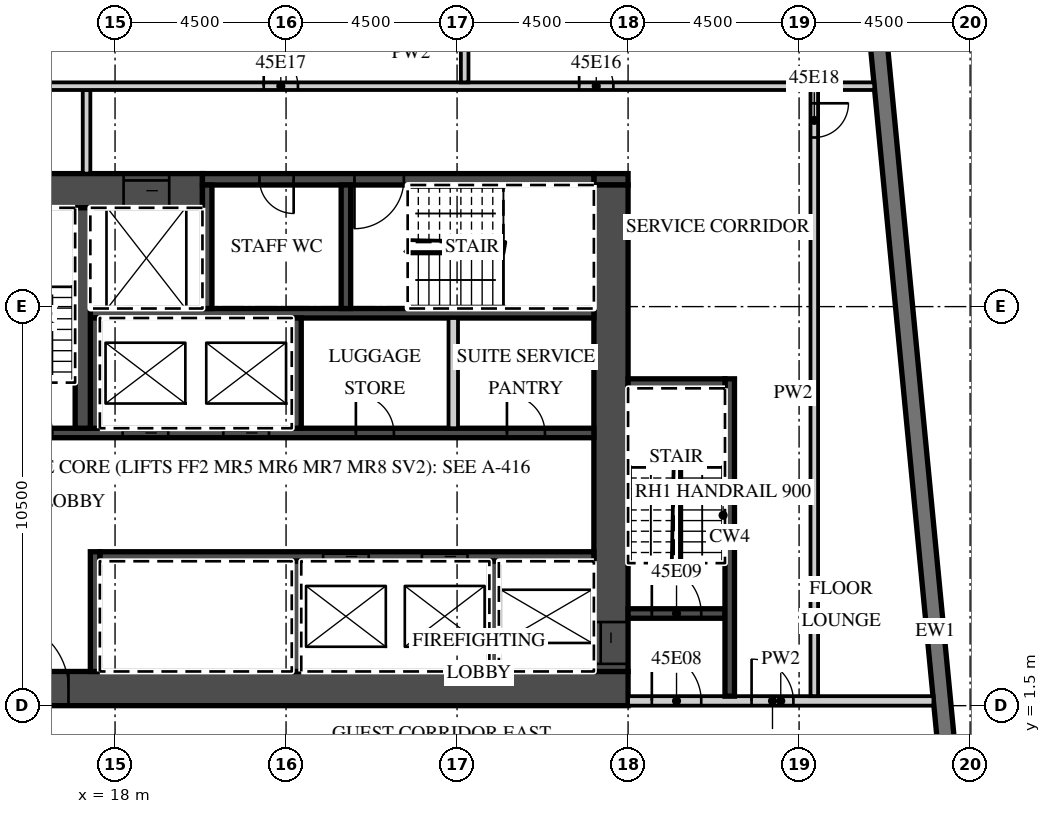
"""IFC4 building model, lengths in metres.
Left out: names, types, materials, properties, quantities, classifications, styles, units other than length and angle.
Written with IfcOpenShell. Run it as: python <this file> out.ifc"""

import sys

from ifc_helpers import new_model, si_unit, direction, frame, frame_2d, origin, place, context, subcontext, project, spatial, rectangle, extrude, element, fill, save


model = new_model("IFC4")
c1 = context("Model", 3, precision=1e-05, world=origin(), true_north=direction((0.0, 1.0)))
c2 = subcontext(c1, "Body", "Model", "MODEL_VIEW")
j1 = project(units=[si_unit("LENGTHUNIT", "METRE"), si_unit("PLANEANGLEUNIT", "RADIAN")], contexts=[c1])
p1 = place(None, origin())
s1 = spatial("IfcSite", under=j1, at=p1, CompositionType="ELEMENT")
p2 = place(p1, origin())
s2 = spatial("IfcBuilding", under=s1, at=p2, CompositionType="ELEMENT")
p3 = place(p2, frame((0.0, 0.0, 190.0)))
s3 = spatial("IfcBuildingStorey", under=s2, at=p3, CompositionType="ELEMENT", Elevation=190.0)
p4 = place(p3, frame((41.214, -13.466, 0.0), z_axis=(0.0, 0.0, 1.0), x_axis=(-0.095847314626, 0.995396047952, 0.0)))
e1 = element("IfcWall", 1, at=p4, inside=s3, PredefinedType="SOLIDWALL", context=c2, shape_type="SweptSolid", body=[
    extrude(rectangle(XDim=34.0, YDim=0.45, at=frame_2d((17.0, 0.0))), origin(), (0.0, 0.0, 1.0), 3.02),
])
p5 = place(p4, frame((3.869, 0.0, 0.45)))
e2 = element("IfcOpeningElement", 2, at=p5, cuts=e1, PredefinedType="OPENING", context=c2, shape_type="SweptSolid", body=[
    extrude(rectangle(XDim=3.3, YDim=2.25, at=frame_2d((1.65, 1.125))), frame((0.0, 0.235, 0.0), z_axis=(0.0, -1.0, 0.0), x_axis=(1.0, 0.0, 0.0)), (0.0, 0.0, 1.0), 0.47),
])
p6 = place(p4, frame((8.39, 0.0, 0.45)))
e3 = element("IfcOpeningElement", 3, at=p6, cuts=e1, PredefinedType="OPENING", context=c2, shape_type="SweptSolid", body=[
    extrude(rectangle(XDim=3.3, YDim=2.25, at=frame_2d((1.65, 1.125))), frame((0.0, 0.235, 0.0), z_axis=(0.0, -1.0, 0.0), x_axis=(1.0, 0.0, 0.0)), (0.0, 0.0, 1.0), 0.47),
])
p7 = place(p3, frame((13.5, 1.95, 0.0), z_axis=(0.0, 0.0, 1.0), x_axis=(1.0, 0.0, 0.0)))
e4 = element("IfcWall", 4, at=p7, inside=s3, PredefinedType="SHEAR", context=c2, shape_type="SweptSolid", body=[
    extrude(rectangle(XDim=18.0, YDim=0.9, at=frame_2d((9.0, 0.0))), origin(), (0.0, 0.0, 1.0), 3.02),
])
p8 = place(p7, frame((1.475, 0.0, 0.0)))
e5 = element("IfcOpeningElement", 5, at=p8, cuts=e4, PredefinedType="OPENING", context=c2, shape_type="SweptSolid", body=[
    extrude(rectangle(XDim=1.8, YDim=2.1, at=frame_2d((0.9, 1.05))), frame((0.0, 0.46, 0.0), z_axis=(0.0, -1.0, 0.0), x_axis=(1.0, 0.0, 0.0)), (0.0, 0.0, 1.0), 0.92),
])
p9 = place(p3, frame((13.5, 15.05, 0.0), z_axis=(0.0, 0.0, 1.0), x_axis=(1.0, 0.0, 0.0)))
e6 = element("IfcWall", 6, at=p9, inside=s3, PredefinedType="SHEAR", context=c2, shape_type="SweptSolid", body=[
    extrude(rectangle(XDim=6.8, YDim=0.9, at=frame_2d((3.4, 0.0))), origin(), (0.0, 0.0, 1.0), 3.02),
])
p10 = place(p9, frame((4.725, 0.0, 0.0)))
e7 = element("IfcOpeningElement", 7, at=p10, cuts=e6, PredefinedType="OPENING", context=c2, shape_type="SweptSolid", body=[
    extrude(rectangle(XDim=1.2, YDim=2.1, at=frame_2d((0.6, 1.05))), frame((0.0, 0.46, 0.0), z_axis=(0.0, -1.0, 0.0), x_axis=(1.0, 0.0, 0.0)), (0.0, 0.0, 1.0), 0.92),
])
p11 = place(p3, frame((30.6, 15.35, 0.0), z_axis=(0.0, 0.0, 1.0), x_axis=(1.0, 0.0, 0.0)))
e8 = element("IfcWall", 8, at=p11, inside=s3, PredefinedType="SHEAR", context=c2, shape_type="SweptSolid", body=[
    extrude(rectangle(XDim=0.9, YDim=0.3, at=frame_2d((0.45, 0.0))), origin(), (0.0, 0.0, 1.0), 3.02),
])
p12 = place(p3, frame((20.3, 15.35, 0.0), z_axis=(0.0, 0.0, 1.0), x_axis=(1.0, 0.0, 0.0)))
e9 = element("IfcWall", 9, at=p12, inside=s3, PredefinedType="SHEAR", context=c2, shape_type="SweptSolid", body=[
    extrude(rectangle(XDim=10.3, YDim=0.3, at=frame_2d((5.15, 0.0))), origin(), (0.0, 0.0, 1.0), 3.02),
])
p13 = place(p12, frame((4.0, 0.0, 0.0)))
e10 = element("IfcOpeningElement", 10, at=p13, cuts=e9, PredefinedType="OPENING", context=c2, shape_type="SweptSolid", body=[
    extrude(rectangle(XDim=1.3, YDim=2.1, at=frame_2d((0.65, 1.05))), frame((0.0, 0.16, 0.0), z_axis=(0.0, -1.0, 0.0), x_axis=(1.0, 0.0, 0.0)), (0.0, 0.0, 1.0), 0.32),
])
p14 = place(p12, frame((1.5, 0.0, 0.0)))
e11 = element("IfcOpeningElement", 11, at=p14, cuts=e9, PredefinedType="OPENING", context=c2, shape_type="SweptSolid", body=[
    extrude(rectangle(XDim=0.9, YDim=2.1, at=frame_2d((0.45, 1.05))), frame((0.0, 0.16, 0.0), z_axis=(0.0, -1.0, 0.0), x_axis=(1.0, 0.0, 0.0)), (0.0, 0.0, 1.0), 0.32),
])
p15 = place(p3, frame((31.05, 2.4, 0.0), z_axis=(0.0, 0.0, 1.0), x_axis=(0.0, 1.0, 0.0)))
e12 = element("IfcWall", 12, at=p15, inside=s3, PredefinedType="SHEAR", context=c2, shape_type="SweptSolid", body=[
    extrude(rectangle(XDim=12.8, YDim=0.9, at=frame_2d((6.4, 0.0))), origin(), (0.0, 0.0, 1.0), 3.02),
])
p16 = place(p15, frame((0.2, 0.0, 0.0)))
e13 = element("IfcOpeningElement", 13, at=p16, cuts=e12, PredefinedType="OPENING", context=c2, shape_type="SweptSolid", body=[
    extrude(rectangle(XDim=1.1, YDim=2.1, at=frame_2d((0.55, 1.05))), frame((0.0, 0.46, 0.0), z_axis=(0.0, -1.0, 0.0), x_axis=(1.0, 0.0, 0.0)), (0.0, 0.0, 1.0), 0.92),
])
p17 = place(p3, frame((17.6, 5.425, 0.0), z_axis=(0.0, 0.0, 1.0), x_axis=(1.0, 0.0, 0.0)))
e14 = element("IfcWall", 14, at=p17, inside=s3, PredefinedType="SHEAR", context=c2, shape_type="SweptSolid", body=[
    extrude(rectangle(XDim=13.0, YDim=0.25, at=frame_2d((6.5, 0.0))), origin(), (0.0, 0.0, 1.0), 3.02),
])
p18 = place(p17, frame((8.475, 0.0, 0.0)))
e15 = element("IfcOpeningElement", 15, at=p18, cuts=e14, PredefinedType="OPENING", context=c2, shape_type="SweptSolid", body=[
    extrude(rectangle(XDim=1.2, YDim=2.1, at=frame_2d((0.6, 1.05))), frame((0.0, 0.135, 0.0), z_axis=(0.0, -1.0, 0.0), x_axis=(1.0, 0.0, 0.0)), (0.0, 0.0, 1.0), 0.27),
])
p19 = place(p17, frame((5.875, 0.0, 0.0)))
e16 = element("IfcOpeningElement", 16, at=p19, cuts=e14, PredefinedType="OPENING", context=c2, shape_type="SweptSolid", body=[
    extrude(rectangle(XDim=1.2, YDim=2.1, at=frame_2d((0.6, 1.05))), frame((0.0, 0.135, 0.0), z_axis=(0.0, -1.0, 0.0), x_axis=(1.0, 0.0, 0.0)), (0.0, 0.0, 1.0), 0.27),
])
p20 = place(p3, frame((17.475, 2.4, 0.0), z_axis=(0.0, 0.0, 1.0), x_axis=(0.0, 1.0, 0.0)))
e17 = element("IfcWall", 17, at=p20, inside=s3, PredefinedType="SHEAR", context=c2, shape_type="SweptSolid", body=[
    extrude(rectangle(XDim=3.15, YDim=0.25, at=frame_2d((1.575, 0.0))), origin(), (0.0, 0.0, 1.0), 3.02),
])
for number, where, z_axis, x_axis in (
    (18, (27.975, 2.4, 0.0), (0.0, 0.0, 1.0), (0.0, 1.0, 0.0)),
    (19, (22.775, 2.4, 0.0), (0.0, 0.0, 1.0), (0.0, 1.0, 0.0)),
):
    element("IfcWall", number, at=place(p3, frame(where, z_axis=z_axis, x_axis=x_axis)), inside=s3, PredefinedType="SHEAR", context=c2, shape_type="SweptSolid", body=[
        extrude(rectangle(XDim=2.9, YDim=0.25, at=frame_2d((1.45, 0.0))), origin(), (0.0, 0.0, 1.0), 3.02),
    ])
p21 = place(p3, frame((14.4, 8.675, 0.0), z_axis=(0.0, 0.0, 1.0), x_axis=(1.0, 0.0, 0.0)))
e20 = element("IfcWall", 20, at=p21, inside=s3, PredefinedType="SHEAR", context=c2, shape_type="SweptSolid", body=[
    extrude(rectangle(XDim=16.2, YDim=0.25, at=frame_2d((8.1, 0.0))), origin(), (0.0, 0.0, 1.0), 3.02),
])
p22 = place(p21, frame((6.45, 0.0, 0.0)))
e21 = element("IfcOpeningElement", 21, at=p22, cuts=e20, PredefinedType="OPENING", context=c2, shape_type="SweptSolid", body=[
    extrude(rectangle(XDim=1.2, YDim=2.1, at=frame_2d((0.6, 1.05))), frame((0.0, 0.135, 0.0), z_axis=(0.0, -1.0, 0.0), x_axis=(1.0, 0.0, 0.0)), (0.0, 0.0, 1.0), 0.27),
])
p23 = place(p21, frame((3.8, 0.0, 0.0)))
e22 = element("IfcOpeningElement", 22, at=p23, cuts=e20, PredefinedType="OPENING", context=c2, shape_type="SweptSolid", body=[
    extrude(rectangle(XDim=1.2, YDim=2.1, at=frame_2d((0.6, 1.05))), frame((0.0, 0.135, 0.0), z_axis=(0.0, -1.0, 0.0), x_axis=(1.0, 0.0, 0.0)), (0.0, 0.0, 1.0), 0.27),
])
p24 = place(p21, frame((0.65, 0.0, 0.0)))
e23 = element("IfcOpeningElement", 23, at=p24, cuts=e20, PredefinedType="OPENING", context=c2, shape_type="SweptSolid", body=[
    extrude(rectangle(XDim=1.3, YDim=2.1, at=frame_2d((0.65, 1.05))), frame((0.0, 0.135, 0.0), z_axis=(0.0, -1.0, 0.0), x_axis=(1.0, 0.0, 0.0)), (0.0, 0.0, 1.0), 0.27),
])
p25 = place(p21, frame((13.913, 0.0, 0.0)))
e24 = element("IfcOpeningElement", 24, at=p25, cuts=e20, PredefinedType="OPENING", context=c2, shape_type="SweptSolid", body=[
    extrude(rectangle(XDim=1.0, YDim=2.1, at=frame_2d((0.5, 1.05))), frame((0.0, 0.135, 0.0), z_axis=(0.0, -1.0, 0.0), x_axis=(1.0, 0.0, 0.0)), (0.0, 0.0, 1.0), 0.27),
])
p26 = place(p21, frame((9.938, 0.0, 0.0)))
e25 = element("IfcOpeningElement", 25, at=p26, cuts=e20, PredefinedType="OPENING", context=c2, shape_type="SweptSolid", body=[
    extrude(rectangle(XDim=1.0, YDim=2.1, at=frame_2d((0.5, 1.05))), frame((0.0, 0.135, 0.0), z_axis=(0.0, -1.0, 0.0), x_axis=(1.0, 0.0, 0.0)), (0.0, 0.0, 1.0), 0.27),
])
p27 = place(p3, frame((17.35, 11.825, 0.0), z_axis=(0.0, 0.0, 1.0), x_axis=(1.0, 0.0, 0.0)))
e26 = element("IfcWall", 26, at=p27, inside=s3, PredefinedType="SHEAR", context=c2, shape_type="SweptSolid", body=[
    extrude(rectangle(XDim=13.25, YDim=0.25, at=frame_2d((6.625, 0.0))), origin(), (0.0, 0.0, 1.0), 3.02),
])
for number, where, z_axis, x_axis in (
    (27, (17.475, 8.8, 0.0), (0.0, 0.0, 1.0), (0.0, 1.0, 0.0)),
    (28, (22.775, 8.8, 0.0), (0.0, 0.0, 1.0), (0.0, 1.0, 0.0)),
):
    element("IfcWall", number, at=place(p3, frame(where, z_axis=z_axis, x_axis=x_axis)), inside=s3, PredefinedType="SHEAR", context=c2, shape_type="SweptSolid", body=[
        extrude(rectangle(XDim=2.9, YDim=0.25, at=frame_2d((1.45, 0.0))), origin(), (0.0, 0.0, 1.0), 3.02),
    ])
p28 = place(p3, frame((26.9, 8.8, 0.0), z_axis=(0.0, 0.0, 1.0), x_axis=(0.0, 1.0, 0.0)))
e29 = element("IfcWall", 29, at=p28, inside=s3, PredefinedType="PARTITIONING", context=c2, shape_type="SweptSolid", body=[
    extrude(rectangle(XDim=2.9, YDim=0.25, at=frame_2d((1.45, 0.0))), origin(), (0.0, 0.0, 1.0), 3.02),
])
p29 = place(p3, frame((17.15, 8.8, 0.0), z_axis=(0.0, 0.0, 1.0), x_axis=(0.0, 1.0, 0.0)))
e30 = element("IfcWall", 30, at=p29, inside=s3, PredefinedType="SHEAR", context=c2, shape_type="SweptSolid", body=[
    extrude(rectangle(XDim=5.8, YDim=0.4, at=frame_2d((2.9, 0.0))), origin(), (0.0, 0.0, 1.0), 3.02),
])
for number, where, z_axis, x_axis in (
    (31, (20.425, 11.95, 0.0), (0.0, 0.0, 1.0), (0.0, 1.0, 0.0)),
    (32, (24.075, 11.95, 0.0), (0.0, 0.0, 1.0), (0.0, 1.0, 0.0)),
):
    element("IfcWall", number, at=place(p3, frame(where, z_axis=z_axis, x_axis=x_axis)), inside=s3, PredefinedType="SHEAR", context=c2, shape_type="SweptSolid", body=[
        extrude(rectangle(XDim=3.25, YDim=0.25, at=frame_2d((1.625, 0.0))), origin(), (0.0, 0.0, 1.0), 3.02),
    ])
p30 = place(p3, frame((31.5, 1.625, 0.0), z_axis=(0.0, 0.0, 1.0), x_axis=(1.0, 0.0, 0.0)))
e33 = element("IfcWall", 33, at=p30, inside=s3, PredefinedType="PARTITIONING", context=c2, shape_type="SweptSolid", body=[
    extrude(rectangle(XDim=8.035, YDim=0.25, at=frame_2d((4.018, 0.0))), origin(), (0.0, 0.0, 1.0), 3.02),
])
p31 = place(p30, frame((0.625, 0.0, 0.0)))
e34 = element("IfcOpeningElement", 34, at=p31, cuts=e33, PredefinedType="OPENING", context=c2, shape_type="SweptSolid", body=[
    extrude(rectangle(XDim=1.3, YDim=2.1, at=frame_2d((0.65, 1.05))), frame((0.0, 0.135, 0.0), z_axis=(0.0, -1.0, 0.0), x_axis=(1.0, 0.0, 0.0)), (0.0, 0.0, 1.0), 0.27),
])
p32 = place(p30, frame((3.25, 0.0, 0.0)))
e35 = element("IfcOpeningElement", 35, at=p32, cuts=e33, PredefinedType="OPENING", context=c2, shape_type="SweptSolid", body=[
    extrude(rectangle(XDim=1.1, YDim=2.1, at=frame_2d((0.55, 1.05))), frame((0.0, 0.135, 0.0), z_axis=(0.0, -1.0, 0.0), x_axis=(1.0, 0.0, 0.0)), (0.0, 0.0, 1.0), 0.27),
])
p33 = place(p3, frame((31.5, 3.925, 0.0), z_axis=(0.0, 0.0, 1.0), x_axis=(1.0, 0.0, 0.0)))
e36 = element("IfcWall", 36, at=p33, inside=s3, PredefinedType="SHEAR", context=c2, shape_type="SweptSolid", body=[
    extrude(rectangle(XDim=2.55, YDim=0.25, at=frame_2d((1.275, 0.0))), origin(), (0.0, 0.0, 1.0), 3.02),
])
p34 = place(p33, frame((0.625, 0.0, 0.0)))
e37 = element("IfcOpeningElement", 37, at=p34, cuts=e36, PredefinedType="OPENING", context=c2, shape_type="SweptSolid", body=[
    extrude(rectangle(XDim=1.3, YDim=2.1, at=frame_2d((0.65, 1.05))), frame((0.0, 0.135, 0.0), z_axis=(0.0, -1.0, 0.0), x_axis=(1.0, 0.0, 0.0)), (0.0, 0.0, 1.0), 0.27),
])
p35 = place(p3, frame((34.175, 1.75, 0.0), z_axis=(0.0, 0.0, 1.0), x_axis=(0.0, 1.0, 0.0)))
e38 = element("IfcWall", 38, at=p35, inside=s3, PredefinedType="SHEAR", context=c2, shape_type="SweptSolid", body=[
    extrude(rectangle(XDim=8.35, YDim=0.25, at=frame_2d((4.175, 0.0))), origin(), (0.0, 0.0, 1.0), 3.02),
])
p36 = place(p3, frame((31.5, 9.975, 0.0), z_axis=(0.0, 0.0, 1.0), x_axis=(1.0, 0.0, 0.0)))
e39 = element("IfcWall", 39, at=p36, inside=s3, PredefinedType="SHEAR", context=c2, shape_type="SweptSolid", body=[
    extrude(rectangle(XDim=2.55, YDim=0.25, at=frame_2d((1.275, 0.0))), origin(), (0.0, 0.0, 1.0), 3.02),
])
p37 = place(p3, frame((17.25, 15.5, 0.0), z_axis=(0.0, 0.0, 1.0), x_axis=(0.0, 1.0, 0.0)))
e40 = element("IfcWall", 40, at=p37, inside=s3, PredefinedType="PARTITIONING", context=c2, shape_type="SweptSolid", body=[
    extrude(rectangle(XDim=2.2, YDim=0.2, at=frame_2d((1.1, 0.0))), origin(), (0.0, 0.0, 1.0), 3.02),
])
p38 = place(p3, frame((36.4, 1.75, 0.0), z_axis=(0.0, 0.0, 1.0), x_axis=(0.0, 1.0, 0.0)))
e41 = element("IfcWall", 41, at=p38, inside=s3, PredefinedType="PARTITIONING", context=c2, shape_type="SweptSolid", body=[
    extrude(rectangle(XDim=15.95, YDim=0.2, at=frame_2d((7.975, 0.0))), origin(), (0.0, 0.0, 1.0), 3.02),
])
p39 = place(p38, frame((14.7, 0.0, 0.0)))
e42 = element("IfcOpeningElement", 42, at=p39, cuts=e41, PredefinedType="OPENING", context=c2, shape_type="SweptSolid", body=[
    extrude(rectangle(XDim=0.9, YDim=2.1, at=frame_2d((0.45, 1.05))), frame((0.0, 0.11, 0.0), z_axis=(0.0, -1.0, 0.0), x_axis=(1.0, 0.0, 0.0)), (0.0, 0.0, 1.0), 0.22),
])
p40 = place(p3, frame((13.6, 17.8, 0.0), z_axis=(0.0, 0.0, 1.0), x_axis=(1.0, 0.0, 0.0)))
e43 = element("IfcWall", 43, at=p40, inside=s3, PredefinedType="PARTITIONING", context=c2, shape_type="SweptSolid", body=[
    extrude(rectangle(XDim=24.378, YDim=0.2, at=frame_2d((12.189, 0.0))), origin(), (0.0, 0.0, 1.0), 3.02),
])
p41 = place(p40, frame((16.613, 0.0, 0.0)))
e44 = element("IfcOpeningElement", 44, at=p41, cuts=e43, PredefinedType="OPENING", context=c2, shape_type="SweptSolid", body=[
    extrude(rectangle(XDim=0.9, YDim=2.1, at=frame_2d((0.45, 1.05))), frame((0.0, 0.11, 0.0), z_axis=(0.0, -1.0, 0.0), x_axis=(1.0, 0.0, 0.0)), (0.0, 0.0, 1.0), 0.22),
])
p42 = place(p40, frame((8.312, 0.0, 0.0)))
e45 = element("IfcOpeningElement", 45, at=p42, cuts=e43, PredefinedType="OPENING", context=c2, shape_type="SweptSolid", body=[
    extrude(rectangle(XDim=0.9, YDim=2.1, at=frame_2d((0.45, 1.05))), frame((0.0, 0.11, 0.0), z_axis=(0.0, -1.0, 0.0), x_axis=(1.0, 0.0, 0.0)), (0.0, 0.0, 1.0), 0.22),
])
p43 = place(p3, frame((27.2, 17.9, 0.0), z_axis=(0.0, 0.0, 1.0), x_axis=(0.0, 1.0, 0.0)))
e46 = element("IfcWall", 46, at=p43, inside=s3, PredefinedType="PARTITIONING", context=c2, shape_type="SweptSolid", body=[
    extrude(rectangle(XDim=5.01, YDim=0.2, at=frame_2d((2.505, 0.0))), origin(), (0.0, 0.0, 1.0), 3.02),
])
p44 = place(p22, origin())
e47 = element("IfcDoor", 47, at=p44, inside=s3, OperationType="SLIDING_TO_LEFT", PredefinedType="DOOR", context=c2, shape_type="SweptSolid", body=[
    extrude(rectangle(XDim=1.2, YDim=2.1, at=frame_2d((0.6, 1.05))), frame((0.0, 0.025, 0.0), z_axis=(0.0, -1.0, 0.0), x_axis=(1.0, 0.0, 0.0)), (0.0, 0.0, 1.0), 0.05),
])
fill(e21, e47)
p45 = place(p23, origin())
e48 = element("IfcDoor", 48, at=p45, inside=s3, OperationType="SLIDING_TO_RIGHT", PredefinedType="DOOR", context=c2, shape_type="SweptSolid", body=[
    extrude(rectangle(XDim=1.2, YDim=2.1, at=frame_2d((0.6, 1.05))), frame((0.0, 0.025, 0.0), z_axis=(0.0, -1.0, 0.0), x_axis=(1.0, 0.0, 0.0)), (0.0, 0.0, 1.0), 0.05),
])
fill(e22, e48)
p46 = place(p18, origin())
e49 = element("IfcDoor", 49, at=p46, inside=s3, OperationType="SLIDING_TO_LEFT", PredefinedType="DOOR", context=c2, shape_type="SweptSolid", body=[
    extrude(rectangle(XDim=1.2, YDim=2.1, at=frame_2d((0.6, 1.05))), frame((0.0, 0.025, 0.0), z_axis=(0.0, -1.0, 0.0), x_axis=(1.0, 0.0, 0.0)), (0.0, 0.0, 1.0), 0.05),
])
fill(e15, e49)
p47 = place(p19, origin())
e50 = element("IfcDoor", 50, at=p47, inside=s3, OperationType="SLIDING_TO_RIGHT", PredefinedType="DOOR", context=c2, shape_type="SweptSolid", body=[
    extrude(rectangle(XDim=1.2, YDim=2.1, at=frame_2d((0.6, 1.05))), frame((0.0, 0.025, 0.0), z_axis=(0.0, -1.0, 0.0), x_axis=(1.0, 0.0, 0.0)), (0.0, 0.0, 1.0), 0.05),
])
fill(e16, e50)
p48 = place(p10, origin())
e51 = element("IfcDoor", 51, at=p48, inside=s3, OperationType="SLIDING_TO_LEFT", PredefinedType="DOOR", context=c2, shape_type="SweptSolid", body=[
    extrude(rectangle(XDim=1.2, YDim=2.1, at=frame_2d((0.6, 1.05))), frame((0.0, 0.025, 0.0), z_axis=(0.0, -1.0, 0.0), x_axis=(1.0, 0.0, 0.0)), (0.0, 0.0, 1.0), 0.05),
])
fill(e7, e51)
p49 = place(p16, origin())
e52 = element("IfcDoor", 52, at=p49, inside=s3, OperationType="SLIDING_TO_LEFT", PredefinedType="DOOR", context=c2, shape_type="SweptSolid", body=[
    extrude(rectangle(XDim=1.1, YDim=2.1, at=frame_2d((0.55, 1.05))), frame((0.0, 0.025, 0.0), z_axis=(0.0, -1.0, 0.0), x_axis=(1.0, 0.0, 0.0)), (0.0, 0.0, 1.0), 0.05),
])
fill(e13, e52)
p50 = place(p8, origin())
e53 = element("IfcDoor", 53, at=p50, inside=s3, OperationType="DOUBLE_DOOR_DOUBLE_SWING", PredefinedType="DOOR", context=c2, shape_type="SweptSolid", body=[
    extrude(rectangle(XDim=1.8, YDim=2.1, at=frame_2d((0.9, 1.05))), frame((0.0, 0.025, 0.0), z_axis=(0.0, -1.0, 0.0), x_axis=(1.0, 0.0, 0.0)), (0.0, 0.0, 1.0), 0.05),
])
fill(e5, e53)
p51 = place(p31, origin())
e54 = element("IfcDoor", 54, at=p51, inside=s3, OperationType="SINGLE_SWING_LEFT", PredefinedType="DOOR", context=c2, shape_type="SweptSolid", body=[
    extrude(rectangle(XDim=1.3, YDim=2.1, at=frame_2d((0.65, 1.05))), frame((0.0, 0.025, 0.0), z_axis=(0.0, -1.0, 0.0), x_axis=(1.0, 0.0, 0.0)), (0.0, 0.0, 1.0), 0.05),
])
fill(e34, e54)
p52 = place(p34, origin())
e55 = element("IfcDoor", 55, at=p52, inside=s3, OperationType="SINGLE_SWING_LEFT", PredefinedType="DOOR", context=c2, shape_type="SweptSolid", body=[
    extrude(rectangle(XDim=1.3, YDim=2.1, at=frame_2d((0.65, 1.05))), frame((0.0, 0.025, 0.0), z_axis=(0.0, -1.0, 0.0), x_axis=(1.0, 0.0, 0.0)), (0.0, 0.0, 1.0), 0.05),
])
fill(e37, e55)
p53 = place(p32, origin())
e56 = element("IfcDoor", 56, at=p53, inside=s3, OperationType="SINGLE_SWING_LEFT", PredefinedType="DOOR", context=c2, shape_type="SweptSolid", body=[
    extrude(rectangle(XDim=1.1, YDim=2.1, at=frame_2d((0.55, 1.05))), frame((0.0, 0.025, 0.0), z_axis=(0.0, -1.0, 0.0), x_axis=(1.0, 0.0, 0.0)), (0.0, 0.0, 1.0), 0.05),
])
fill(e35, e56)
p54 = place(p13, origin())
e57 = element("IfcDoor", 57, at=p54, inside=s3, OperationType="SINGLE_SWING_LEFT", PredefinedType="DOOR", context=c2, shape_type="SweptSolid", body=[
    extrude(rectangle(XDim=1.3, YDim=2.1, at=frame_2d((0.65, 1.05))), frame((0.0, 0.025, 0.0), z_axis=(0.0, -1.0, 0.0), x_axis=(1.0, 0.0, 0.0)), (0.0, 0.0, 1.0), 0.05),
])
fill(e10, e57)
p55 = place(p14, origin())
e58 = element("IfcDoor", 58, at=p55, inside=s3, OperationType="SINGLE_SWING_RIGHT", PredefinedType="DOOR", context=c2, shape_type="SweptSolid", body=[
    extrude(rectangle(XDim=0.9, YDim=2.1, at=frame_2d((0.45, 1.05))), frame((0.0, 0.025, 0.0), z_axis=(0.0, -1.0, 0.0), x_axis=(1.0, 0.0, 0.0)), (0.0, 0.0, 1.0), 0.05),
])
fill(e11, e58)
p56 = place(p25, origin())
e59 = element("IfcDoor", 59, at=p56, inside=s3, OperationType="SINGLE_SWING_LEFT", PredefinedType="DOOR", context=c2, shape_type="SweptSolid", body=[
    extrude(rectangle(XDim=1.0, YDim=2.1, at=frame_2d((0.5, 1.05))), frame((0.0, 0.025, 0.0), z_axis=(0.0, -1.0, 0.0), x_axis=(1.0, 0.0, 0.0)), (0.0, 0.0, 1.0), 0.05),
])
fill(e24, e59)
p57 = place(p26, origin())
e60 = element("IfcDoor", 60, at=p57, inside=s3, OperationType="SINGLE_SWING_LEFT", PredefinedType="DOOR", context=c2, shape_type="SweptSolid", body=[
    extrude(rectangle(XDim=1.0, YDim=2.1, at=frame_2d((0.5, 1.05))), frame((0.0, 0.025, 0.0), z_axis=(0.0, -1.0, 0.0), x_axis=(1.0, 0.0, 0.0)), (0.0, 0.0, 1.0), 0.05),
])
fill(e25, e60)
p58 = place(p41, origin())
e61 = element("IfcDoor", 61, at=p58, inside=s3, OperationType="SINGLE_SWING_LEFT", PredefinedType="DOOR", context=c2, shape_type="SweptSolid", body=[
    extrude(rectangle(XDim=0.9, YDim=2.1, at=frame_2d((0.45, 1.05))), frame((0.0, 0.025, 0.0), z_axis=(0.0, -1.0, 0.0), x_axis=(1.0, 0.0, 0.0)), (0.0, 0.0, 1.0), 0.05),
])
fill(e44, e61)
p59 = place(p42, origin())
e62 = element("IfcDoor", 62, at=p59, inside=s3, OperationType="SINGLE_SWING_LEFT", PredefinedType="DOOR", context=c2, shape_type="SweptSolid", body=[
    extrude(rectangle(XDim=0.9, YDim=2.1, at=frame_2d((0.45, 1.05))), frame((0.0, 0.025, 0.0), z_axis=(0.0, -1.0, 0.0), x_axis=(1.0, 0.0, 0.0)), (0.0, 0.0, 1.0), 0.05),
])
fill(e45, e62)
p60 = place(p39, origin())
e63 = element("IfcDoor", 63, at=p60, inside=s3, OperationType="SINGLE_SWING_RIGHT", PredefinedType="DOOR", context=c2, shape_type="SweptSolid", body=[
    extrude(rectangle(XDim=0.9, YDim=2.1, at=frame_2d((0.45, 1.05))), frame((0.0, 0.025, 0.0), z_axis=(0.0, -1.0, 0.0), x_axis=(1.0, 0.0, 0.0)), (0.0, 0.0, 1.0), 0.05),
])
fill(e42, e63)
save(model, sys.argv[1])
